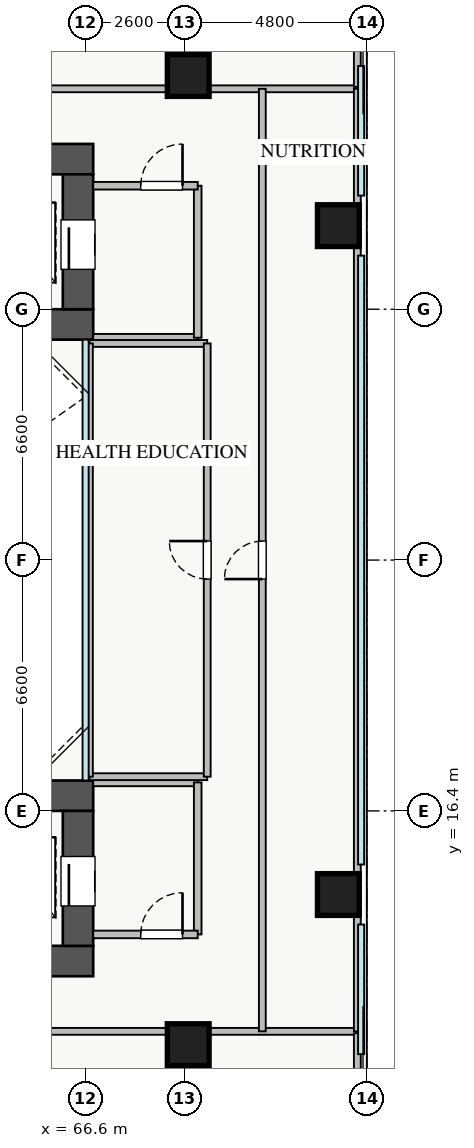
"""IFC4 building model, lengths in metres.
Left out: names, types, materials, properties, quantities, classifications, styles, units other than length and angle.
Written with IfcOpenShell. Run it as: python <this file> out.ifc"""

import sys

from ifc_helpers import new_model, si_unit, direction, frame, frame_2d, origin, origin_2d, place, context, subcontext, project, spatial, rectangle, extrude, source, transform, mapped, element, fill, save


model = new_model("IFC4")
c1 = context("Model", 3, precision=1e-05, world=origin(), true_north=direction((0.0, 1.0)))
c2 = subcontext(c1, "Body", "Model", "MODEL_VIEW")
j1 = project(units=[si_unit("LENGTHUNIT", "METRE"), si_unit("PLANEANGLEUNIT", "RADIAN")], contexts=[c1])
p1 = place(None, origin())
s1 = spatial("IfcSite", under=j1, at=p1, CompositionType="ELEMENT")
p2 = place(p1, origin())
s2 = spatial("IfcBuilding", under=s1, at=p2, CompositionType="ELEMENT")
p3 = place(p2, frame((0.0, 0.0, 18.2)))
s3 = spatial("IfcBuildingStorey", under=s2, at=p3, CompositionType="ELEMENT", Elevation=18.2)
p4 = place(p3, frame((54.2, 29.2, 0.0), z_axis=(0.0, 0.0, 1.0), x_axis=(1.0, 0.0, 0.0)))
e1 = element("IfcWall", 1, at=p4, inside=s3, PredefinedType="SHEAR", context=c2, shape_type="SweptSolid", body=[
    extrude(rectangle(XDim=12.6, YDim=0.8, at=frame_2d((6.3, 0.0))), origin(), (0.0, 0.0, 1.0), 4.8),
])
p5 = place(p3, frame((54.2, 33.55, 0.0), z_axis=(0.0, 0.0, 1.0), x_axis=(1.0, 0.0, 0.0)))
e2 = element("IfcWall", 2, at=p5, inside=s3, PredefinedType="SHEAR", context=c2, shape_type="SweptSolid", body=[
    extrude(rectangle(XDim=12.6, YDim=0.8, at=frame_2d((6.3, 0.0))), origin(), (0.0, 0.0, 1.0), 4.8),
])
p6 = place(p5, frame((8.2, 0.0, 0.0)))
e3 = element("IfcOpeningElement", 3, at=p6, cuts=e2, PredefinedType="OPENING", context=c2, shape_type="SweptSolid", body=[
    extrude(rectangle(XDim=1.1, YDim=2.05, at=frame_2d((0.55, 1.025))), frame((0.0, 0.41, 0.0), z_axis=(0.0, -1.0, 0.0), x_axis=(1.0, 0.0, 0.0)), (0.0, 0.0, 1.0), 0.82),
])
p7 = place(p3, frame((66.4, 29.6, 0.0), z_axis=(0.0, 0.0, 1.0), x_axis=(0.0, 1.0, 0.0)))
e4 = element("IfcWall", 4, at=p7, inside=s3, PredefinedType="SHEAR", context=c2, shape_type="SweptSolid", body=[
    extrude(rectangle(XDim=3.55, YDim=0.8, at=frame_2d((1.775, 0.0))), origin(), (0.0, 0.0, 1.0), 4.8),
])
p8 = place(p7, frame((1.05, 0.0, 0.0)))
e5 = element("IfcOpeningElement", 5, at=p8, cuts=e4, PredefinedType="OPENING", context=c2, shape_type="SweptSolid", body=[
    extrude(rectangle(XDim=1.3, YDim=2.05, at=frame_2d((0.65, 1.025))), frame((0.0, 0.41, 0.0), z_axis=(0.0, -1.0, 0.0), x_axis=(1.0, 0.0, 0.0)), (0.0, 0.0, 1.0), 0.82),
])
p9 = place(p3, frame((54.2, 12.45, 0.0), z_axis=(0.0, 0.0, 1.0), x_axis=(1.0, 0.0, 0.0)))
e6 = element("IfcWall", 6, at=p9, inside=s3, PredefinedType="SHEAR", context=c2, shape_type="SweptSolid", body=[
    extrude(rectangle(XDim=12.6, YDim=0.8, at=frame_2d((6.3, 0.0))), origin(), (0.0, 0.0, 1.0), 4.8),
])
p10 = place(p9, frame((8.2, 0.0, 0.0)))
e7 = element("IfcOpeningElement", 7, at=p10, cuts=e6, PredefinedType="OPENING", context=c2, shape_type="SweptSolid", body=[
    extrude(rectangle(XDim=1.1, YDim=2.05, at=frame_2d((0.55, 1.025))), frame((0.0, 0.41, 0.0), z_axis=(0.0, -1.0, 0.0), x_axis=(1.0, 0.0, 0.0)), (0.0, 0.0, 1.0), 0.82),
])
p11 = place(p3, frame((54.2, 16.8, 0.0), z_axis=(0.0, 0.0, 1.0), x_axis=(1.0, 0.0, 0.0)))
e8 = element("IfcWall", 8, at=p11, inside=s3, PredefinedType="SHEAR", context=c2, shape_type="SweptSolid", body=[
    extrude(rectangle(XDim=12.6, YDim=0.8, at=frame_2d((6.3, 0.0))), origin(), (0.0, 0.0, 1.0), 4.8),
])
p12 = place(p3, frame((66.4, 12.85, 0.0), z_axis=(0.0, 0.0, 1.0), x_axis=(0.0, 1.0, 0.0)))
e9 = element("IfcWall", 9, at=p12, inside=s3, PredefinedType="SHEAR", context=c2, shape_type="SweptSolid", body=[
    extrude(rectangle(XDim=3.55, YDim=0.8, at=frame_2d((1.775, 0.0))), origin(), (0.0, 0.0, 1.0), 4.8),
])
p13 = place(p12, frame((1.05, 0.0, 0.0)))
e10 = element("IfcOpeningElement", 10, at=p13, cuts=e9, PredefinedType="OPENING", context=c2, shape_type="SweptSolid", body=[
    extrude(rectangle(XDim=1.3, YDim=2.05, at=frame_2d((0.65, 1.025))), frame((0.0, 0.41, 0.0), z_axis=(0.0, -1.0, 0.0), x_axis=(1.0, 0.0, 0.0)), (0.0, 0.0, 1.0), 0.82),
])
m1 = source(origin(), c2, "Body", "SweptSolid", [
    extrude(rectangle(XDim=1.1, YDim=1.1, at=origin_2d()), origin(), (0.0, 0.0, 1.0), 4.8),
])
for number, where, z_axis, x_axis in (
    (11, (69.3, 10.25, 0.0), (0.0, 0.0, 1.0), (1.0, 0.0, 0.0)),
    (12, (73.25, 14.2, 0.0), (0.0, 0.0, 1.0), (1.0, 0.0, 0.0)),
    (13, (73.25, 31.8, 0.0), (0.0, 0.0, 1.0), (1.0, 0.0, 0.0)),
    (14, (69.3, 35.75, 0.0), (0.0, 0.0, 1.0), (1.0, 0.0, 0.0)),
):
    element("IfcColumn", number, at=place(p3, frame(where, z_axis=z_axis, x_axis=x_axis)), inside=s3, PredefinedType="COLUMN", context=c2, shape_type="MappedRepresentation", body=[
        mapped(m1, transform((0.0, 0.0, 0.0), x_axis=(1.0, 0.0, 0.0), y_axis=(0.0, 1.0, 0.0), z_axis=(0.0, 0.0, 1.0), scale=1.0)),
    ])
p14 = place(p3, frame((66.8, 28.85, 0.0), z_axis=(0.0, 0.0, 1.0), x_axis=(1.0, 0.0, 0.0)))
e15 = element("IfcWall", 15, at=p14, inside=s3, PredefinedType="PARTITIONING", context=c2, shape_type="SweptSolid", body=[
    extrude(rectangle(XDim=2.75, YDim=0.2, at=frame_2d((1.375, 0.0))), origin(), (0.0, 0.0, 1.0), 4.62),
])
p15 = place(p3, frame((69.55, 28.85, 0.0), z_axis=(0.0, 0.0, 1.0), x_axis=(0.0, 1.0, 0.0)))
e16 = element("IfcWall", 16, at=p15, inside=s3, PredefinedType="PARTITIONING", context=c2, shape_type="SweptSolid", body=[
    extrude(rectangle(XDim=4.0, YDim=0.2, at=frame_2d((2.0, 0.0))), origin(), (0.0, 0.0, 1.0), 4.62),
])
p16 = place(p3, frame((66.8, 32.85, 0.0), z_axis=(0.0, 0.0, 1.0), x_axis=(1.0, 0.0, 0.0)))
e17 = element("IfcWall", 17, at=p16, inside=s3, PredefinedType="PARTITIONING", context=c2, shape_type="SweptSolid", body=[
    extrude(rectangle(XDim=2.75, YDim=0.2, at=frame_2d((1.375, 0.0))), origin(), (0.0, 0.0, 1.0), 4.62),
])
p17 = place(p16, frame((1.25, 0.0, 0.0)))
e18 = element("IfcOpeningElement", 18, at=p17, cuts=e17, PredefinedType="OPENING", context=c2, shape_type="SweptSolid", body=[
    extrude(rectangle(XDim=1.1, YDim=2.05, at=frame_2d((0.55, 1.025))), frame((0.0, 0.11, 0.0), z_axis=(0.0, -1.0, 0.0), x_axis=(1.0, 0.0, 0.0)), (0.0, 0.0, 1.0), 0.22),
])
p18 = place(p3, frame((66.8, 17.15, 0.0), z_axis=(0.0, 0.0, 1.0), x_axis=(1.0, 0.0, 0.0)))
e19 = element("IfcWall", 19, at=p18, inside=s3, PredefinedType="PARTITIONING", context=c2, shape_type="SweptSolid", body=[
    extrude(rectangle(XDim=2.75, YDim=0.2, at=frame_2d((1.375, 0.0))), origin(), (0.0, 0.0, 1.0), 4.62),
])
p19 = place(p3, frame((69.55, 13.15, 0.0), z_axis=(0.0, 0.0, 1.0), x_axis=(0.0, 1.0, 0.0)))
e20 = element("IfcWall", 20, at=p19, inside=s3, PredefinedType="PARTITIONING", context=c2, shape_type="SweptSolid", body=[
    extrude(rectangle(XDim=4.0, YDim=0.2, at=frame_2d((2.0, 0.0))), origin(), (0.0, 0.0, 1.0), 4.62),
])
p20 = place(p3, frame((66.8, 13.15, 0.0), z_axis=(0.0, 0.0, 1.0), x_axis=(1.0, 0.0, 0.0)))
e21 = element("IfcWall", 21, at=p20, inside=s3, PredefinedType="PARTITIONING", context=c2, shape_type="SweptSolid", body=[
    extrude(rectangle(XDim=2.75, YDim=0.2, at=frame_2d((1.375, 0.0))), origin(), (0.0, 0.0, 1.0), 4.62),
])
p21 = place(p20, frame((1.25, 0.0, 0.0)))
e22 = element("IfcOpeningElement", 22, at=p21, cuts=e21, PredefinedType="OPENING", context=c2, shape_type="SweptSolid", body=[
    extrude(rectangle(XDim=1.1, YDim=2.05, at=frame_2d((0.55, 1.025))), frame((0.0, 0.11, 0.0), z_axis=(0.0, -1.0, 0.0), x_axis=(1.0, 0.0, 0.0)), (0.0, 0.0, 1.0), 0.22),
])
for number, where, z_axis, x_axis in (
    (23, (66.7, 17.3, 0.0), (0.0, 0.0, 1.0), (1.0, 0.0, 0.0)),
    (24, (66.7, 28.7, 0.0), (0.0, 0.0, 1.0), (1.0, 0.0, 0.0)),
):
    element("IfcWall", number, at=place(p3, frame(where, z_axis=z_axis, x_axis=x_axis)), inside=s3, PredefinedType="PARTITIONING", context=c2, shape_type="SweptSolid", body=[
        extrude(rectangle(XDim=3.1, YDim=0.18, at=frame_2d((1.55, 0.0))), origin(), (0.0, 0.0, 1.0), 4.62),
    ])
p22 = place(p3, frame((66.7, 17.3, 0.0), z_axis=(0.0, 0.0, 1.0), x_axis=(0.0, 1.0, 0.0)))
e25 = element("IfcWall", 25, at=p22, inside=s3, PredefinedType="PARTITIONING", context=c2, shape_type="SweptSolid", body=[
    extrude(rectangle(XDim=11.4, YDim=0.18, at=frame_2d((5.7, 0.0))), origin(), (0.0, 0.0, 1.0), 4.62),
])
p23 = place(p3, frame((69.8, 17.3, 0.0), z_axis=(0.0, 0.0, 1.0), x_axis=(0.0, 1.0, 0.0)))
e26 = element("IfcWall", 26, at=p23, inside=s3, PredefinedType="PARTITIONING", context=c2, shape_type="SweptSolid", body=[
    extrude(rectangle(XDim=11.4, YDim=0.18, at=frame_2d((5.7, 0.0))), origin(), (0.0, 0.0, 1.0), 4.62),
])
p24 = place(p23, frame((5.2, 0.0, 0.0)))
e27 = element("IfcOpeningElement", 27, at=p24, cuts=e26, PredefinedType="OPENING", context=c2, shape_type="SweptSolid", body=[
    extrude(rectangle(XDim=1.0, YDim=2.05, at=frame_2d((0.5, 1.025))), frame((0.0, 0.1, 0.0), z_axis=(0.0, -1.0, 0.0), x_axis=(1.0, 0.0, 0.0)), (0.0, 0.0, 1.0), 0.2),
])
p25 = place(p3, frame((54.2, 10.6, 0.0), z_axis=(0.0, 0.0, 1.0), x_axis=(1.0, 0.0, 0.0)))
e28 = element("IfcWall", 28, at=p25, inside=s3, PredefinedType="PARTITIONING", context=c2, shape_type="SweptSolid", body=[
    extrude(rectangle(XDim=19.55, YDim=0.18, at=frame_2d((9.775, 0.0))), origin(), (0.0, 0.0, 1.0), 4.62),
])
p26 = place(p25, frame((9.275, 0.0, 0.0)))
e29 = element("IfcOpeningElement", 29, at=p26, cuts=e28, PredefinedType="OPENING", context=c2, shape_type="SweptSolid", body=[
    extrude(rectangle(XDim=1.0, YDim=2.05, at=frame_2d((0.5, 1.025))), frame((0.0, 0.1, 0.0), z_axis=(0.0, -1.0, 0.0), x_axis=(1.0, 0.0, 0.0)), (0.0, 0.0, 1.0), 0.2),
])
p27 = place(p3, frame((54.2, 35.4, 0.0), z_axis=(0.0, 0.0, 1.0), x_axis=(1.0, 0.0, 0.0)))
e30 = element("IfcWall", 30, at=p27, inside=s3, PredefinedType="PARTITIONING", context=c2, shape_type="SweptSolid", body=[
    extrude(rectangle(XDim=19.55, YDim=0.18, at=frame_2d((9.775, 0.0))), origin(), (0.0, 0.0, 1.0), 4.62),
])
p28 = place(p27, frame((9.275, 0.0, 0.0)))
e31 = element("IfcOpeningElement", 31, at=p28, cuts=e30, PredefinedType="OPENING", context=c2, shape_type="SweptSolid", body=[
    extrude(rectangle(XDim=1.0, YDim=2.05, at=frame_2d((0.5, 1.025))), frame((0.0, 0.1, 0.0), z_axis=(0.0, -1.0, 0.0), x_axis=(1.0, 0.0, 0.0)), (0.0, 0.0, 1.0), 0.2),
])
p29 = place(p3, frame((71.25, 10.6, 0.0), z_axis=(0.0, 0.0, 1.0), x_axis=(0.0, 1.0, 0.0)))
e32 = element("IfcWall", 32, at=p29, inside=s3, PredefinedType="PARTITIONING", context=c2, shape_type="SweptSolid", body=[
    extrude(rectangle(XDim=24.8, YDim=0.18, at=frame_2d((12.4, 0.0))), origin(), (0.0, 0.0, 1.0), 4.62),
])
p30 = place(p29, frame((11.9, 0.0, 0.0)))
e33 = element("IfcOpeningElement", 33, at=p30, cuts=e32, PredefinedType="OPENING", context=c2, shape_type="SweptSolid", body=[
    extrude(rectangle(XDim=1.0, YDim=2.05, at=frame_2d((0.5, 1.025))), frame((0.0, 0.1, 0.0), z_axis=(0.0, -1.0, 0.0), x_axis=(1.0, 0.0, 0.0)), (0.0, 0.0, 1.0), 0.2),
])
p31 = place(p3, frame((73.75, 10.6, 0.0), z_axis=(0.0, 0.0, 1.0), x_axis=(0.0, 1.0, 0.0)))
e34 = element("IfcWall", 34, at=p31, inside=s3, PredefinedType="PARTITIONING", context=c2, shape_type="SweptSolid", body=[
    extrude(rectangle(XDim=24.8, YDim=0.18, at=frame_2d((12.4, 0.0))), origin(), (0.0, 0.0, 1.0), 4.62),
])
for number, where, z_axis, x_axis in (
    (35, (73.75, 6.75, 0.0), (0.0, 0.0, 1.0), (0.0, 1.0, 0.0)),
    (36, (73.75, 35.45, 0.0), (0.0, 0.0, 1.0), (0.0, 1.0, 0.0)),
):
    element("IfcWall", number, at=place(p3, frame(where, z_axis=z_axis, x_axis=x_axis)), inside=s3, PredefinedType="PARTITIONING", context=c2, shape_type="SweptSolid", body=[
        extrude(rectangle(XDim=3.8, YDim=0.18, at=frame_2d((1.9, 0.0))), origin(), (0.0, 0.0, 1.0), 4.62),
    ])
m2 = source(origin(), c2, "Body", "SweptSolid", [
    extrude(rectangle(XDim=1.3, YDim=2.05, at=frame_2d((0.65, 1.025))), frame((0.0, 0.025, 0.0), z_axis=(0.0, -1.0, 0.0), x_axis=(1.0, 0.0, 0.0)), (0.0, 0.0, 1.0), 0.05),
])
p32 = place(p8, origin())
e37 = element("IfcDoor", 37, at=p32, inside=s3, OperationType="SLIDING_TO_LEFT", PredefinedType="DOOR", context=c2, shape_type="MappedRepresentation", body=[
    mapped(m2, transform((0.0, 0.0, 0.0), x_axis=(1.0, 0.0, 0.0), y_axis=(0.0, 1.0, 0.0), z_axis=(0.0, 0.0, 1.0), scale=1.0)),
])
fill(e5, e37)
p33 = place(p13, origin())
e38 = element("IfcDoor", 38, at=p33, inside=s3, OperationType="SLIDING_TO_RIGHT", PredefinedType="DOOR", context=c2, shape_type="MappedRepresentation", body=[
    mapped(m2, transform((0.0, 0.0, 0.0), x_axis=(1.0, 0.0, 0.0), y_axis=(0.0, 1.0, 0.0), z_axis=(0.0, 0.0, 1.0), scale=1.0)),
])
fill(e10, e38)
m3 = source(origin(), c2, "Body", "SweptSolid", [
    extrude(rectangle(XDim=1.1, YDim=2.05, at=frame_2d((0.55, 1.025))), frame((0.0, 0.025, 0.0), z_axis=(0.0, -1.0, 0.0), x_axis=(1.0, 0.0, 0.0)), (0.0, 0.0, 1.0), 0.05),
])
p34 = place(p17, origin())
e39 = element("IfcDoor", 39, at=p34, inside=s3, OperationType="SINGLE_SWING_RIGHT", PredefinedType="DOOR", context=c2, shape_type="MappedRepresentation", body=[
    mapped(m3, transform((0.0, 0.0, 0.0), x_axis=(1.0, 0.0, 0.0), y_axis=(0.0, 1.0, 0.0), z_axis=(0.0, 0.0, 1.0), scale=1.0)),
])
fill(e18, e39)
p35 = place(p21, origin())
e40 = element("IfcDoor", 40, at=p35, inside=s3, OperationType="SINGLE_SWING_RIGHT", PredefinedType="DOOR", context=c2, shape_type="MappedRepresentation", body=[
    mapped(m3, transform((0.0, 0.0, 0.0), x_axis=(1.0, 0.0, 0.0), y_axis=(0.0, 1.0, 0.0), z_axis=(0.0, 0.0, 1.0), scale=1.0)),
])
fill(e22, e40)
m4 = source(origin(), c2, "Body", "SweptSolid", [
    extrude(rectangle(XDim=1.0, YDim=2.05, at=frame_2d((0.5, 1.025))), frame((0.0, 0.025, 0.0), z_axis=(0.0, -1.0, 0.0), x_axis=(1.0, 0.0, 0.0)), (0.0, 0.0, 1.0), 0.05),
])
p36 = place(p24, origin())
e41 = element("IfcDoor", 41, at=p36, inside=s3, OperationType="SINGLE_SWING_RIGHT", PredefinedType="DOOR", context=c2, shape_type="MappedRepresentation", body=[
    mapped(m4, transform((0.0, 0.0, 0.0), x_axis=(1.0, 0.0, 0.0), y_axis=(0.0, 1.0, 0.0), z_axis=(0.0, 0.0, 1.0), scale=1.0)),
])
fill(e27, e41)
p37 = place(p30, origin())
e42 = element("IfcDoor", 42, at=p37, inside=s3, OperationType="SINGLE_SWING_LEFT", PredefinedType="DOOR", context=c2, shape_type="MappedRepresentation", body=[
    mapped(m4, transform((0.0, 0.0, 0.0), x_axis=(1.0, 0.0, 0.0), y_axis=(0.0, 1.0, 0.0), z_axis=(0.0, 0.0, 1.0), scale=1.0)),
])
fill(e33, e42)
save(model, sys.argv[1])
